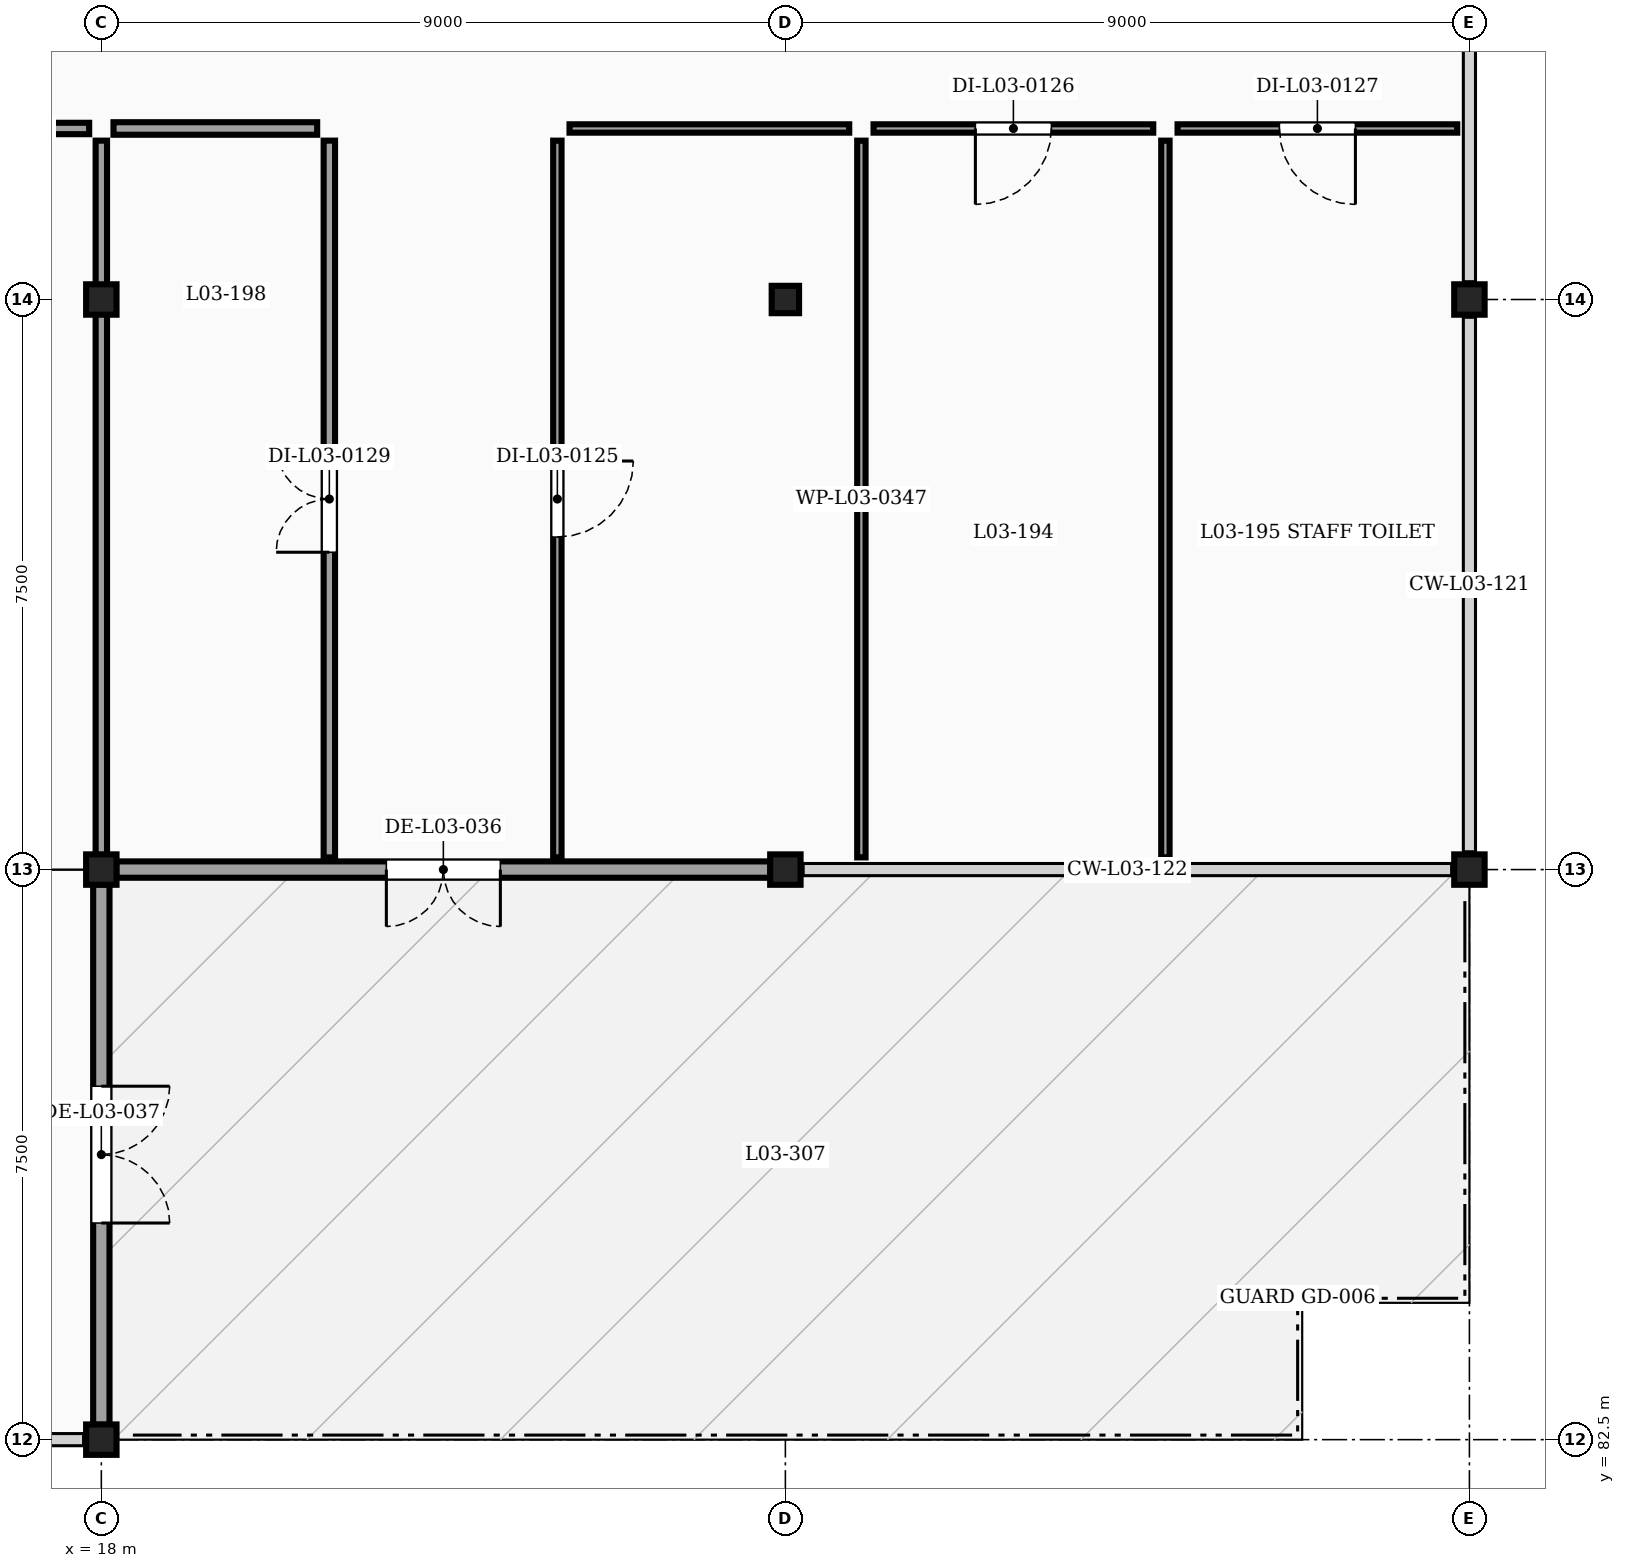
"""IFC4 building model, lengths in metres.
Left out: names, types, materials, properties, quantities, classifications, styles, units other than length and angle.
Written with IfcOpenShell. Run it as: python <this file> out.ifc"""

import sys

from ifc_helpers import new_model, si_unit, direction, frame, frame_2d, origin, origin_2d, place, context, subcontext, project, spatial, rectangle, extrude, element, fill, save


model = new_model("IFC4")
c1 = context("Model", 3, precision=1e-05, world=origin(), true_north=direction((0.0, 1.0)))
c2 = subcontext(c1, "Body", "Model", "MODEL_VIEW")
j1 = project(units=[si_unit("LENGTHUNIT", "METRE"), si_unit("PLANEANGLEUNIT", "RADIAN")], contexts=[c1])
p1 = place(None, origin())
s1 = spatial("IfcSite", under=j1, at=p1, CompositionType="ELEMENT")
p2 = place(p1, origin())
s2 = spatial("IfcBuilding", under=s1, at=p2, CompositionType="ELEMENT")
p3 = place(p2, frame((0.0, 0.0, 12.3)))
s3 = spatial("IfcBuildingStorey", under=s2, at=p3, CompositionType="ELEMENT", Elevation=12.3)
for number, where, z_axis, x_axis in (
    (1, (18.0, 82.5, 0.0), (0.0, 0.0, 1.0), (1.0, 0.0, 0.0)),
    (2, (18.0, 90.0, 0.0), (0.0, 0.0, 1.0), (1.0, 0.0, 0.0)),
    (3, (27.0, 90.0, 0.0), (0.0, 0.0, 1.0), (1.0, 0.0, 0.0)),
    (4, (36.0, 90.0, 0.0), (0.0, 0.0, 1.0), (1.0, 0.0, 0.0)),
    (5, (18.0, 97.5, 0.0), (0.0, 0.0, 1.0), (1.0, 0.0, 0.0)),
):
    element("IfcColumn", number, at=place(p3, frame(where, z_axis=z_axis, x_axis=x_axis)), inside=s3, PredefinedType="COLUMN", context=c2, shape_type="SweptSolid", body=[
        extrude(rectangle(XDim=0.4, YDim=0.4, at=origin_2d()), origin(), (0.0, 0.0, 1.0), 3.65),
    ])
p4 = place(p3, frame((27.0, 97.5, 0.0), z_axis=(0.0, 0.0, 1.0), x_axis=(1.0, 0.0, 0.0)))
e6 = element("IfcColumn", 6, at=p4, inside=s3, PredefinedType="COLUMN", context=c2, shape_type="SweptSolid", body=[
    extrude(rectangle(XDim=0.36, YDim=0.36, at=origin_2d()), origin(), (0.0, 0.0, 1.0), 3.65),
])
p5 = place(p3, frame((36.0, 97.5, 0.0), z_axis=(0.0, 0.0, 1.0), x_axis=(1.0, 0.0, 0.0)))
e7 = element("IfcColumn", 7, at=p5, inside=s3, PredefinedType="COLUMN", context=c2, shape_type="SweptSolid", body=[
    extrude(rectangle(XDim=0.4, YDim=0.4, at=origin_2d()), origin(), (0.0, 0.0, 1.0), 3.65),
])
p6 = place(p3, frame((26.804, 90.0, 0.0), z_axis=(0.0, 0.0, 1.0), x_axis=(-1.0, 0.0, 0.0)))
e8 = element("IfcWall", 8, at=p6, inside=s3, PredefinedType="SOLIDWALL", context=c2, shape_type="SweptSolid", body=[
    extrude(rectangle(XDim=8.608, YDim=0.215, at=frame_2d((4.304, 0.0))), origin(), (0.0, 0.0, 1.0), 3.057),
])
p7 = place(p6, frame((3.554, 0.0, 0.0)))
e9 = element("IfcOpeningElement", 9, at=p7, cuts=e8, PredefinedType="OPENING", context=c2, shape_type="SweptSolid", body=[
    extrude(rectangle(XDim=1.5, YDim=2.15, at=frame_2d((0.75, 1.075))), frame((0.0, 0.117, 0.0), z_axis=(0.0, -1.0, 0.0), x_axis=(1.0, 0.0, 0.0)), (0.0, 0.0, 1.0), 0.235),
])
p8 = place(p3, frame((18.0, 89.804, 0.0), z_axis=(0.0, 0.0, 1.0), x_axis=(0.0, -1.0, 0.0)))
e10 = element("IfcWall", 10, at=p8, inside=s3, PredefinedType="SOLIDWALL", context=c2, shape_type="SweptSolid", body=[
    extrude(rectangle(XDim=7.108, YDim=0.215, at=frame_2d((3.554, 0.0))), origin(), (0.0, 0.0, 1.0), 3.057),
])
p9 = place(p8, frame((2.654, 0.0, 0.0)))
e11 = element("IfcOpeningElement", 11, at=p9, cuts=e10, PredefinedType="OPENING", context=c2, shape_type="SweptSolid", body=[
    extrude(rectangle(XDim=1.8, YDim=2.2, at=frame_2d((0.9, 1.1))), frame((0.0, 0.117, 0.0), z_axis=(0.0, -1.0, 0.0), x_axis=(1.0, 0.0, 0.0)), (0.0, 0.0, 1.0), 0.235),
])
p10 = place(p3, frame((28.0, 90.16, 0.0), z_axis=(0.0, 0.0, 1.0), x_axis=(0.0, 1.0, 0.0)))
e12 = element("IfcWall", 12, at=p10, inside=s3, PredefinedType="PARTITIONING", context=c2, shape_type="SweptSolid", body=[
    extrude(rectangle(XDim=9.43, YDim=0.11, at=frame_2d((4.715, 0.0))), origin(), (0.0, 0.0, 1.0), 3.65),
])
p11 = place(p3, frame((24.0, 99.59, 0.0), z_axis=(0.0, 0.0, 1.0), x_axis=(0.0, -1.0, 0.0)))
e13 = element("IfcWall", 13, at=p11, inside=s3, PredefinedType="PARTITIONING", context=c2, shape_type="SweptSolid", body=[
    extrude(rectangle(XDim=9.43, YDim=0.11, at=frame_2d((4.715, 0.0))), origin(), (0.0, 0.0, 1.0), 3.342),
])
p12 = place(p11, frame((4.215, 0.0, 0.0)))
e14 = element("IfcOpeningElement", 14, at=p12, cuts=e13, PredefinedType="OPENING", context=c2, shape_type="SweptSolid", body=[
    extrude(rectangle(XDim=1.0, YDim=2.15, at=frame_2d((0.5, 1.075))), frame((0.0, 0.065, 0.0), z_axis=(0.0, -1.0, 0.0), x_axis=(1.0, 0.0, 0.0)), (0.0, 0.0, 1.0), 0.13),
])
p13 = place(p3, frame((27.84, 99.75, 0.0), z_axis=(0.0, 0.0, 1.0), x_axis=(-1.0, 0.0, 0.0)))
e15 = element("IfcWall", 15, at=p13, inside=s3, PredefinedType="PARTITIONING", context=c2, shape_type="SweptSolid", body=[
    extrude(rectangle(XDim=3.68, YDim=0.11, at=frame_2d((1.84, 0.0))), origin(), (0.0, 0.0, 1.0), 3.65),
])
p14 = place(p3, frame((32.0, 90.16, 0.0), z_axis=(0.0, 0.0, 1.0), x_axis=(0.0, 1.0, 0.0)))
e16 = element("IfcWall", 16, at=p14, inside=s3, PredefinedType="PARTITIONING", context=c2, shape_type="SweptSolid", body=[
    extrude(rectangle(XDim=9.43, YDim=0.11, at=frame_2d((4.715, 0.0))), origin(), (0.0, 0.0, 1.0), 3.65),
])
p15 = place(p3, frame((31.84, 99.75, 0.0), z_axis=(0.0, 0.0, 1.0), x_axis=(-1.0, 0.0, 0.0)))
e17 = element("IfcWall", 17, at=p15, inside=s3, PredefinedType="PARTITIONING", context=c2, shape_type="SweptSolid", body=[
    extrude(rectangle(XDim=3.68, YDim=0.11, at=frame_2d((1.84, 0.0))), origin(), (0.0, 0.0, 1.0), 3.65),
])
p16 = place(p15, frame((1.34, 0.0, 0.0)))
e18 = element("IfcOpeningElement", 18, at=p16, cuts=e17, PredefinedType="OPENING", context=c2, shape_type="SweptSolid", body=[
    extrude(rectangle(XDim=1.0, YDim=2.15, at=frame_2d((0.5, 1.075))), frame((0.0, 0.065, 0.0), z_axis=(0.0, -1.0, 0.0), x_axis=(1.0, 0.0, 0.0)), (0.0, 0.0, 1.0), 0.13),
])
p17 = place(p3, frame((35.84, 99.75, 0.0), z_axis=(0.0, 0.0, 1.0), x_axis=(-1.0, 0.0, 0.0)))
e19 = element("IfcWall", 19, at=p17, inside=s3, PredefinedType="PARTITIONING", context=c2, shape_type="SweptSolid", body=[
    extrude(rectangle(XDim=3.68, YDim=0.11, at=frame_2d((1.84, 0.0))), origin(), (0.0, 0.0, 1.0), 3.65),
])
p18 = place(p17, frame((1.34, 0.0, 0.0)))
e20 = element("IfcOpeningElement", 20, at=p18, cuts=e19, PredefinedType="OPENING", context=c2, shape_type="SweptSolid", body=[
    extrude(rectangle(XDim=1.0, YDim=2.15, at=frame_2d((0.5, 1.075))), frame((0.0, 0.065, 0.0), z_axis=(0.0, -1.0, 0.0), x_axis=(1.0, 0.0, 0.0)), (0.0, 0.0, 1.0), 0.13),
])
p19 = place(p3, frame((17.84, 99.75, 0.0), z_axis=(0.0, 0.0, 1.0), x_axis=(-1.0, 0.0, 0.0)))
e21 = element("IfcWall", 21, at=p19, inside=s3, PredefinedType="PARTITIONING", context=c2, shape_type="SweptSolid", body=[
    extrude(rectangle(XDim=2.68, YDim=0.15, at=frame_2d((1.34, 0.0))), origin(), (0.0, 0.0, 1.0), 3.65),
])
p20 = place(p3, frame((21.0, 90.16, 0.0), z_axis=(0.0, 0.0, 1.0), x_axis=(0.0, 1.0, 0.0)))
e22 = element("IfcWall", 22, at=p20, inside=s3, PredefinedType="PARTITIONING", context=c2, shape_type="SweptSolid", body=[
    extrude(rectangle(XDim=9.43, YDim=0.15, at=frame_2d((4.715, 0.0))), origin(), (0.0, 0.0, 1.0), 3.342),
])
p21 = place(p20, frame((4.015, 0.0, 0.0)))
e23 = element("IfcOpeningElement", 23, at=p21, cuts=e22, PredefinedType="OPENING", context=c2, shape_type="SweptSolid", body=[
    extrude(rectangle(XDim=1.4, YDim=2.15, at=frame_2d((0.7, 1.075))), frame((0.0, 0.085, 0.0), z_axis=(0.0, -1.0, 0.0), x_axis=(1.0, 0.0, 0.0)), (0.0, 0.0, 1.0), 0.17),
])
p22 = place(p3, frame((20.84, 99.75, 0.0), z_axis=(0.0, 0.0, 1.0), x_axis=(-1.0, 0.0, 0.0)))
e24 = element("IfcWall", 24, at=p22, inside=s3, PredefinedType="PARTITIONING", context=c2, shape_type="SweptSolid", body=[
    extrude(rectangle(XDim=2.68, YDim=0.165, at=frame_2d((1.34, 0.0))), origin(), (0.0, 0.0, 1.0), 3.65),
])
p23 = place(p3, frame((18.0, 90.16, 0.0), z_axis=(0.0, 0.0, 1.0), x_axis=(0.0, 1.0, 0.0)))
e25 = element("IfcWall", 25, at=p23, inside=s3, PredefinedType="PARTITIONING", context=c2, shape_type="SweptSolid", body=[
    extrude(rectangle(XDim=9.43, YDim=0.15, at=frame_2d((4.715, 0.0))), origin(), (0.0, 0.0, 1.0), 3.192),
])
p24 = place(p7, origin())
e26 = element("IfcDoor", 26, at=p24, inside=s3, OperationType="DOUBLE_DOOR_SINGLE_SWING", PredefinedType="DOOR", context=c2, shape_type="SweptSolid", body=[
    extrude(rectangle(XDim=1.5, YDim=2.15, at=frame_2d((0.75, 1.075))), frame((0.0, 0.025, 0.0), z_axis=(0.0, -1.0, 0.0), x_axis=(1.0, 0.0, 0.0)), (0.0, 0.0, 1.0), 0.05),
])
fill(e9, e26)
p25 = place(p9, origin())
e27 = element("IfcDoor", 27, at=p25, inside=s3, OperationType="DOUBLE_DOOR_SINGLE_SWING", PredefinedType="DOOR", context=c2, shape_type="SweptSolid", body=[
    extrude(rectangle(XDim=1.8, YDim=2.2, at=frame_2d((0.9, 1.1))), frame((0.0, 0.025, 0.0), z_axis=(0.0, -1.0, 0.0), x_axis=(1.0, 0.0, 0.0)), (0.0, 0.0, 1.0), 0.05),
])
fill(e11, e27)
p26 = place(p12, origin())
e28 = element("IfcDoor", 28, at=p26, inside=s3, OperationType="SINGLE_SWING_LEFT", PredefinedType="DOOR", context=c2, shape_type="SweptSolid", body=[
    extrude(rectangle(XDim=1.0, YDim=2.15, at=frame_2d((0.5, 1.075))), frame((0.0, 0.025, 0.0), z_axis=(0.0, -1.0, 0.0), x_axis=(1.0, 0.0, 0.0)), (0.0, 0.0, 1.0), 0.05),
])
fill(e14, e28)
p27 = place(p16, origin())
e29 = element("IfcDoor", 29, at=p27, inside=s3, OperationType="SINGLE_SWING_RIGHT", PredefinedType="DOOR", context=c2, shape_type="SweptSolid", body=[
    extrude(rectangle(XDim=1.0, YDim=2.15, at=frame_2d((0.5, 1.075))), frame((0.0, 0.025, 0.0), z_axis=(0.0, -1.0, 0.0), x_axis=(1.0, 0.0, 0.0)), (0.0, 0.0, 1.0), 0.05),
])
fill(e18, e29)
p28 = place(p18, origin())
e30 = element("IfcDoor", 30, at=p28, inside=s3, OperationType="SINGLE_SWING_LEFT", PredefinedType="DOOR", context=c2, shape_type="SweptSolid", body=[
    extrude(rectangle(XDim=1.0, YDim=2.15, at=frame_2d((0.5, 1.075))), frame((0.0, 0.025, 0.0), z_axis=(0.0, -1.0, 0.0), x_axis=(1.0, 0.0, 0.0)), (0.0, 0.0, 1.0), 0.05),
])
fill(e20, e30)
p29 = place(p21, origin())
e31 = element("IfcDoor", 31, at=p29, inside=s3, OperationType="DOUBLE_DOOR_SINGLE_SWING", PredefinedType="DOOR", context=c2, shape_type="SweptSolid", body=[
    extrude(rectangle(XDim=1.4, YDim=2.15, at=frame_2d((0.7, 1.075))), frame((0.0, 0.025, 0.0), z_axis=(0.0, -1.0, 0.0), x_axis=(1.0, 0.0, 0.0)), (0.0, 0.0, 1.0), 0.05),
])
fill(e23, e31)
save(model, sys.argv[1])
